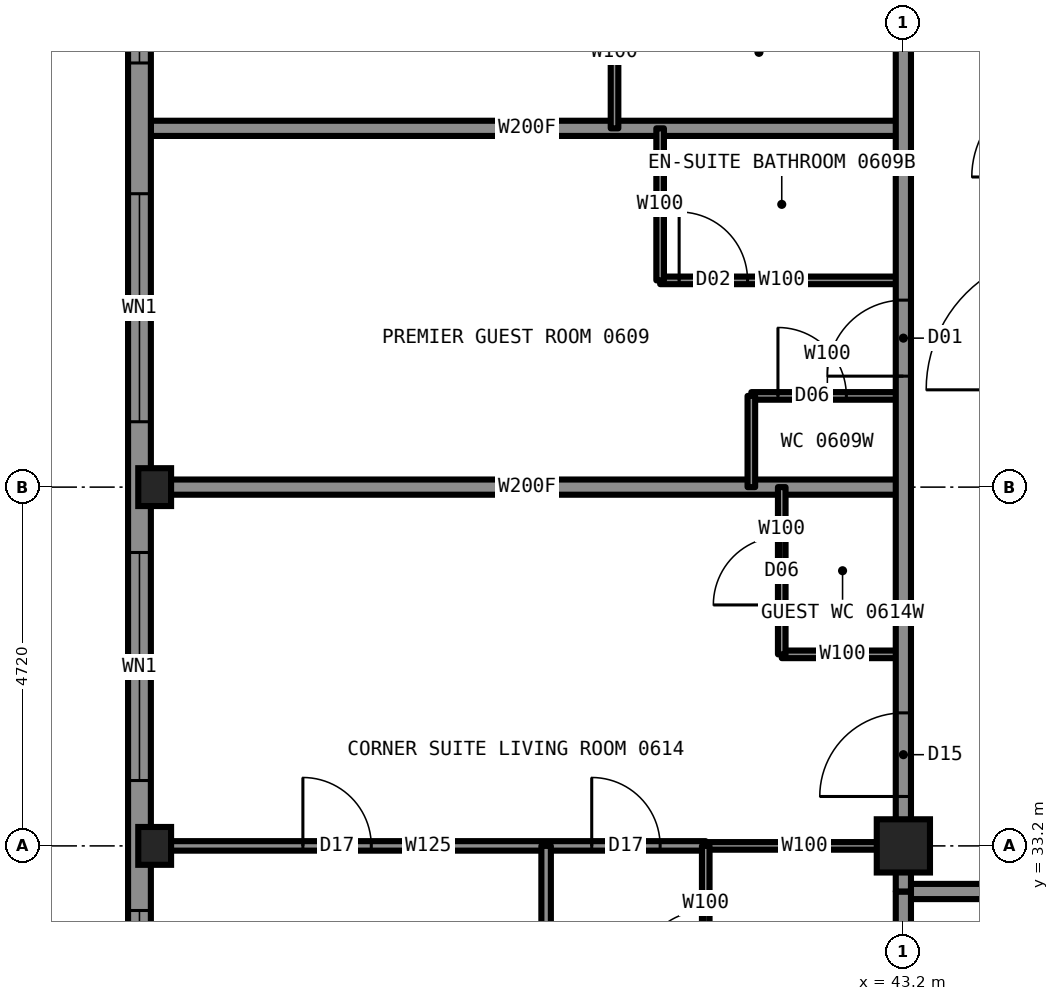
"""IFC4 building model, lengths in metres.
Left out: names, types, materials, properties, quantities, classifications, styles, units other than length and angle.
Written with IfcOpenShell. Run it as: python <this file> out.ifc"""

import sys

from ifc_helpers import new_model, si_unit, direction, frame, frame_2d, origin, origin_2d, place, context, subcontext, project, spatial, rectangle, hollow_rectangle, i_section, extrude, element, fill, save


model = new_model("IFC4")
c1 = context("Model", 3, precision=1e-05, world=origin(), true_north=direction((0.0, 1.0)))
c2 = subcontext(c1, "Body", "Model", "MODEL_VIEW")
j1 = project(units=[si_unit("LENGTHUNIT", "METRE"), si_unit("PLANEANGLEUNIT", "RADIAN")], contexts=[c1])
p1 = place(None, origin())
s1 = spatial("IfcSite", under=j1, at=p1, CompositionType="ELEMENT")
p2 = place(p1, origin())
s2 = spatial("IfcBuilding", under=s1, at=p2, CompositionType="ELEMENT")
p3 = place(p2, frame((0.0, 0.0, 28.5)))
s3 = spatial("IfcBuildingStorey", under=s2, at=p3, CompositionType="ELEMENT", Elevation=28.5)
for number, where, z_axis, x_axis in (
    (1, (33.35, 33.2, 0.0), (0.0, 0.0, 1.0), (1.0, 0.0, 0.0)),
    (2, (33.35, 37.92, 0.0), (0.0, 0.0, 1.0), (1.0, 0.0, 0.0)),
):
    element("IfcColumn", number, at=place(p3, frame(where, z_axis=z_axis, x_axis=x_axis)), inside=s3, PredefinedType="COLUMN", context=c2, shape_type="SweptSolid", body=[
        extrude(i_section(OverallWidth=0.432, OverallDepth=0.498, WebThickness=0.056, FlangeThickness=0.089, at=origin_2d()), origin(), (0.0, 0.0, 1.0), 3.5),
    ])
p4 = place(p3, frame((43.2, 33.2, 0.0), z_axis=(0.0, 0.0, 1.0), x_axis=(1.0, 0.0, 0.0)))
e3 = element("IfcColumn", 3, at=p4, inside=s3, PredefinedType="COLUMN", context=c2, shape_type="SweptSolid", body=[
    extrude(hollow_rectangle(XDim=0.7, YDim=0.7, WallThickness=0.06, at=origin_2d()), origin(), (0.0, 0.0, 1.0), 3.5),
])
p5 = place(p3, frame((40.6, 33.2, 0.0), z_axis=(0.0, 0.0, 1.0), x_axis=(1.0, 0.0, 0.0)))
e4 = element("IfcWall", 4, at=p5, inside=s3, PredefinedType="PARTITIONING", context=c2, shape_type="SweptSolid", body=[
    extrude(rectangle(XDim=2.6, YDim=0.1, at=frame_2d((1.3, 0.0))), origin(), (0.0, 0.0, 1.0), 2.573),
])
p6 = place(p3, frame((33.3, 33.2, 0.0), z_axis=(0.0, 0.0, 1.0), x_axis=(1.0, 0.0, 0.0)))
e5 = element("IfcWall", 5, at=p6, inside=s3, PredefinedType="PARTITIONING", context=c2, shape_type="SweptSolid", body=[
    extrude(rectangle(XDim=7.3, YDim=0.125, at=frame_2d((3.65, 0.0))), origin(), (0.0, 0.0, 1.0), 2.573),
])
p7 = place(p6, frame((5.8, 0.0, 0.0)))
e6 = element("IfcOpeningElement", 6, at=p7, cuts=e5, PredefinedType="OPENING", context=c2, shape_type="SweptSolid", body=[
    extrude(rectangle(XDim=0.9, YDim=2.2, at=frame_2d((0.45, 1.1))), frame((0.0, 0.073, 0.0), z_axis=(0.0, -1.0, 0.0), x_axis=(1.0, 0.0, 0.0)), (0.0, 0.0, 1.0), 0.145),
])
p8 = place(p6, frame((2.0, 0.0, 0.0)))
e7 = element("IfcOpeningElement", 7, at=p8, cuts=e5, PredefinedType="OPENING", context=c2, shape_type="SweptSolid", body=[
    extrude(rectangle(XDim=0.9, YDim=2.2, at=frame_2d((0.45, 1.1))), frame((0.0, 0.073, 0.0), z_axis=(0.0, -1.0, 0.0), x_axis=(1.0, 0.0, 0.0)), (0.0, 0.0, 1.0), 0.145),
])
p9 = place(p3, frame((43.2, 32.6, 0.0), z_axis=(0.0, 0.0, 1.0), x_axis=(1.0, 0.0, 0.0)))
e8 = element("IfcWall", 8, at=p9, inside=s3, PredefinedType="PARTITIONING", context=c2, shape_type="SweptSolid", body=[
    extrude(rectangle(XDim=23.6, YDim=0.2, at=frame_2d((11.8, 0.0))), origin(), (0.0, 0.0, 1.0), 3.33),
])
p10 = place(p9, frame((1.85, 0.0, 0.0)))
e9 = element("IfcOpeningElement", 9, at=p10, cuts=e8, PredefinedType="OPENING", context=c2, shape_type="SweptSolid", body=[
    extrude(rectangle(XDim=1.1, YDim=2.2, at=frame_2d((0.55, 1.1))), frame((0.0, 0.11, 0.0), z_axis=(0.0, -1.0, 0.0), x_axis=(1.0, 0.0, 0.0)), (0.0, 0.0, 1.0), 0.22),
])
p11 = place(p9, frame((14.56, 0.0, 0.0)))
e10 = element("IfcOpeningElement", 10, at=p11, cuts=e8, PredefinedType="OPENING", context=c2, shape_type="SweptSolid", body=[
    extrude(rectangle(XDim=1.0, YDim=2.2, at=frame_2d((0.5, 1.1))), frame((0.0, 0.11, 0.0), z_axis=(0.0, -1.0, 0.0), x_axis=(1.0, 0.0, 0.0)), (0.0, 0.0, 1.0), 0.22),
])
p12 = place(p9, frame((19.28, 0.0, 0.0)))
e11 = element("IfcOpeningElement", 11, at=p12, cuts=e8, PredefinedType="OPENING", context=c2, shape_type="SweptSolid", body=[
    extrude(rectangle(XDim=1.0, YDim=2.2, at=frame_2d((0.5, 1.1))), frame((0.0, 0.11, 0.0), z_axis=(0.0, -1.0, 0.0), x_axis=(1.0, 0.0, 0.0)), (0.0, 0.0, 1.0), 0.22),
])
p13 = place(p3, frame((33.3, 42.64, 0.0), z_axis=(0.0, 0.0, 1.0), x_axis=(1.0, 0.0, 0.0)))
e12 = element("IfcWall", 12, at=p13, inside=s3, PredefinedType="PARTITIONING", context=c2, shape_type="SweptSolid", body=[
    extrude(rectangle(XDim=9.9, YDim=0.2, at=frame_2d((4.95, 0.0))), origin(), (0.0, 0.0, 1.0), 2.723),
])
p14 = place(p3, frame((40.0, 40.64, 0.0), z_axis=(0.0, 0.0, 1.0), x_axis=(1.0, 0.0, 0.0)))
e13 = element("IfcWall", 13, at=p14, inside=s3, PredefinedType="PARTITIONING", context=c2, shape_type="SweptSolid", body=[
    extrude(rectangle(XDim=3.2, YDim=0.1, at=frame_2d((1.6, 0.0))), origin(), (0.0, 0.0, 1.0), 3.33),
])
p15 = place(p14, frame((0.25, 0.0, 0.0)))
e14 = element("IfcOpeningElement", 14, at=p15, cuts=e13, PredefinedType="OPENING", context=c2, shape_type="SweptSolid", body=[
    extrude(rectangle(XDim=0.9, YDim=2.1, at=frame_2d((0.45, 1.05))), frame((0.0, 0.06, 0.0), z_axis=(0.0, -1.0, 0.0), x_axis=(1.0, 0.0, 0.0)), (0.0, 0.0, 1.0), 0.12),
])
p16 = place(p3, frame((41.2, 39.12, 0.0), z_axis=(0.0, 0.0, 1.0), x_axis=(1.0, 0.0, 0.0)))
e15 = element("IfcWall", 15, at=p16, inside=s3, PredefinedType="PARTITIONING", context=c2, shape_type="SweptSolid", body=[
    extrude(rectangle(XDim=2.0, YDim=0.1, at=frame_2d((1.0, 0.0))), origin(), (0.0, 0.0, 1.0), 3.33),
])
p17 = place(p16, frame((0.35, 0.0, 0.0)))
e16 = element("IfcOpeningElement", 16, at=p17, cuts=e15, PredefinedType="OPENING", context=c2, shape_type="SweptSolid", body=[
    extrude(rectangle(XDim=0.9, YDim=2.1, at=frame_2d((0.45, 1.05))), frame((0.0, 0.06, 0.0), z_axis=(0.0, -1.0, 0.0), x_axis=(1.0, 0.0, 0.0)), (0.0, 0.0, 1.0), 0.12),
])
p18 = place(p3, frame((33.3, 37.92, 0.0), z_axis=(0.0, 0.0, 1.0), x_axis=(1.0, 0.0, 0.0)))
e17 = element("IfcWall", 17, at=p18, inside=s3, PredefinedType="PARTITIONING", context=c2, shape_type="SweptSolid", body=[
    extrude(rectangle(XDim=9.9, YDim=0.2, at=frame_2d((4.95, 0.0))), origin(), (0.0, 0.0, 1.0), 2.573),
])
p19 = place(p3, frame((41.6, 35.72, 0.0), z_axis=(0.0, 0.0, 1.0), x_axis=(1.0, 0.0, 0.0)))
e18 = element("IfcWall", 18, at=p19, inside=s3, PredefinedType="PARTITIONING", context=c2, shape_type="SweptSolid", body=[
    extrude(rectangle(XDim=1.6, YDim=0.1, at=frame_2d((0.8, 0.0))), origin(), (0.0, 0.0, 1.0), 2.723),
])
p20 = place(p3, frame((43.2, 33.22, 0.0), z_axis=(0.0, 0.0, 1.0), x_axis=(0.0, 1.0, 0.0)))
e19 = element("IfcWall", 19, at=p20, inside=s3, PredefinedType="PARTITIONING", context=c2, shape_type="SweptSolid", body=[
    extrude(rectangle(XDim=23.56, YDim=0.2, at=frame_2d((11.78, 0.0))), origin(), (0.0, 0.0, 1.0), 3.33),
])
p21 = place(p20, frame((6.16, 0.0, 0.0)))
e20 = element("IfcOpeningElement", 20, at=p21, cuts=e19, PredefinedType="OPENING", context=c2, shape_type="SweptSolid", body=[
    extrude(rectangle(XDim=1.0, YDim=2.2, at=frame_2d((0.5, 1.1))), frame((0.0, 0.11, 0.0), z_axis=(0.0, -1.0, 0.0), x_axis=(1.0, 0.0, 0.0)), (0.0, 0.0, 1.0), 0.22),
])
p22 = place(p20, frame((11.68, 0.0, 0.0)))
e21 = element("IfcOpeningElement", 21, at=p22, cuts=e19, PredefinedType="OPENING", context=c2, shape_type="SweptSolid", body=[
    extrude(rectangle(XDim=1.0, YDim=2.2, at=frame_2d((0.5, 1.1))), frame((0.0, 0.11, 0.0), z_axis=(0.0, -1.0, 0.0), x_axis=(1.0, 0.0, 0.0)), (0.0, 0.0, 1.0), 0.22),
])
p23 = place(p20, frame((14.54, 0.0, 0.0)))
e22 = element("IfcOpeningElement", 22, at=p23, cuts=e19, PredefinedType="OPENING", context=c2, shape_type="SweptSolid", body=[
    extrude(rectangle(XDim=1.0, YDim=2.2, at=frame_2d((0.5, 1.1))), frame((0.0, 0.11, 0.0), z_axis=(0.0, -1.0, 0.0), x_axis=(1.0, 0.0, 0.0)), (0.0, 0.0, 1.0), 0.22),
])
p24 = place(p20, frame((21.83, 0.0, 0.0)))
e23 = element("IfcOpeningElement", 23, at=p24, cuts=e19, PredefinedType="OPENING", context=c2, shape_type="SweptSolid", body=[
    extrude(rectangle(XDim=1.1, YDim=2.2, at=frame_2d((0.55, 1.1))), frame((0.0, 0.11, 0.0), z_axis=(0.0, -1.0, 0.0), x_axis=(1.0, 0.0, 0.0)), (0.0, 0.0, 1.0), 0.22),
])
p25 = place(p20, frame((0.63, 0.0, 0.0)))
e24 = element("IfcOpeningElement", 24, at=p25, cuts=e19, PredefinedType="OPENING", context=c2, shape_type="SweptSolid", body=[
    extrude(rectangle(XDim=1.1, YDim=2.2, at=frame_2d((0.55, 1.1))), frame((0.0, 0.11, 0.0), z_axis=(0.0, -1.0, 0.0), x_axis=(1.0, 0.0, 0.0)), (0.0, 0.0, 1.0), 0.22),
])
p26 = place(p3, frame((43.2, 30.6, 0.0), z_axis=(0.0, 0.0, 1.0), x_axis=(0.0, 1.0, 0.0)))
e25 = element("IfcWall", 25, at=p26, inside=s3, PredefinedType="PARTITIONING", context=c2, shape_type="SweptSolid", body=[
    extrude(rectangle(XDim=2.0, YDim=0.2, at=frame_2d((1.0, 0.0))), origin(), (0.0, 0.0, 1.0), 2.573),
])
p27 = place(p3, frame((41.6, 35.72, 0.0), z_axis=(0.0, 0.0, 1.0), x_axis=(0.0, 1.0, 0.0)))
e26 = element("IfcWall", 26, at=p27, inside=s3, PredefinedType="PARTITIONING", context=c2, shape_type="SweptSolid", body=[
    extrude(rectangle(XDim=2.2, YDim=0.1, at=frame_2d((1.1, 0.0))), origin(), (0.0, 0.0, 1.0), 3.33),
])
p28 = place(p27, frame((0.65, 0.0, 0.0)))
e27 = element("IfcOpeningElement", 27, at=p28, cuts=e26, PredefinedType="OPENING", context=c2, shape_type="SweptSolid", body=[
    extrude(rectangle(XDim=0.9, YDim=2.1, at=frame_2d((0.45, 1.05))), frame((0.0, 0.06, 0.0), z_axis=(0.0, -1.0, 0.0), x_axis=(1.0, 0.0, 0.0)), (0.0, 0.0, 1.0), 0.12),
])
p29 = place(p3, frame((41.2, 37.92, 0.0), z_axis=(0.0, 0.0, 1.0), x_axis=(0.0, 1.0, 0.0)))
e28 = element("IfcWall", 28, at=p29, inside=s3, PredefinedType="PARTITIONING", context=c2, shape_type="SweptSolid", body=[
    extrude(rectangle(XDim=1.2, YDim=0.1, at=frame_2d((0.6, 0.0))), origin(), (0.0, 0.0, 1.0), 3.33),
])
p30 = place(p3, frame((40.6, 30.6, 0.0), z_axis=(0.0, 0.0, 1.0), x_axis=(0.0, 1.0, 0.0)))
e29 = element("IfcWall", 29, at=p30, inside=s3, PredefinedType="PARTITIONING", context=c2, shape_type="SweptSolid", body=[
    extrude(rectangle(XDim=2.6, YDim=0.1, at=frame_2d((1.3, 0.0))), origin(), (0.0, 0.0, 1.0), 3.33),
])
p31 = place(p30, frame((0.85, 0.0, 0.0)))
e30 = element("IfcOpeningElement", 30, at=p31, cuts=e29, PredefinedType="OPENING", context=c2, shape_type="SweptSolid", body=[
    extrude(rectangle(XDim=0.9, YDim=2.1, at=frame_2d((0.45, 1.05))), frame((0.0, 0.06, 0.0), z_axis=(0.0, -1.0, 0.0), x_axis=(1.0, 0.0, 0.0)), (0.0, 0.0, 1.0), 0.12),
])
for number, where, z_axis, x_axis in (
    (31, (40.0, 40.64, 0.0), (0.0, 0.0, 1.0), (0.0, 1.0, 0.0)),
    (32, (39.4, 42.64, 0.0), (0.0, 0.0, 1.0), (0.0, 1.0, 0.0)),
):
    element("IfcWall", number, at=place(p3, frame(where, z_axis=z_axis, x_axis=x_axis)), inside=s3, PredefinedType="PARTITIONING", context=c2, shape_type="SweptSolid", body=[
        extrude(rectangle(XDim=2.0, YDim=0.1, at=frame_2d((1.0, 0.0))), origin(), (0.0, 0.0, 1.0), 3.33),
    ])
p32 = place(p3, frame((38.5, 23.306, 0.0), z_axis=(0.0, 0.0, 1.0), x_axis=(0.0, 1.0, 0.0)))
e33 = element("IfcWall", 33, at=p32, inside=s3, PredefinedType="PARTITIONING", context=c2, shape_type="SweptSolid", body=[
    extrude(rectangle(XDim=9.894, YDim=0.125, at=frame_2d((4.947, 0.0))), origin(), (0.0, 0.0, 1.0), 3.33),
])
p33 = place(p3, frame((33.15, 61.5, 0.0), z_axis=(0.0, 0.0, 1.0), x_axis=(0.0, -1.0, 0.0)))
e34 = element("IfcWall", 34, at=p33, inside=s3, PredefinedType="SOLIDWALL", context=c2, shape_type="SweptSolid", body=[
    extrude(rectangle(XDim=33.0, YDim=0.3, at=frame_2d((16.5, 0.0))), origin(), (0.0, 0.0, 1.0), 2.83),
])
p34 = place(p33, frame((0.85, 0.0, 0.5)))
e35 = element("IfcOpeningElement", 35, at=p34, cuts=e34, PredefinedType="OPENING", context=c2, shape_type="SweptSolid", body=[
    extrude(rectangle(XDim=3.0, YDim=2.0, at=frame_2d((1.5, 1.0))), frame((0.0, 0.16, 0.0), z_axis=(0.0, -1.0, 0.0), x_axis=(1.0, 0.0, 0.0)), (0.0, 0.0, 1.0), 0.32),
])
p35 = place(p33, frame((5.56, 0.0, 0.5)))
e36 = element("IfcOpeningElement", 36, at=p35, cuts=e34, PredefinedType="OPENING", context=c2, shape_type="SweptSolid", body=[
    extrude(rectangle(XDim=3.0, YDim=2.0, at=frame_2d((1.5, 1.0))), frame((0.0, 0.16, 0.0), z_axis=(0.0, -1.0, 0.0), x_axis=(1.0, 0.0, 0.0)), (0.0, 0.0, 1.0), 0.32),
])
p36 = place(p33, frame((10.28, 0.0, 0.5)))
e37 = element("IfcOpeningElement", 37, at=p36, cuts=e34, PredefinedType="OPENING", context=c2, shape_type="SweptSolid", body=[
    extrude(rectangle(XDim=3.0, YDim=2.0, at=frame_2d((1.5, 1.0))), frame((0.0, 0.16, 0.0), z_axis=(0.0, -1.0, 0.0), x_axis=(1.0, 0.0, 0.0)), (0.0, 0.0, 1.0), 0.32),
])
p37 = place(p33, frame((15.0, 0.0, 0.5)))
e38 = element("IfcOpeningElement", 38, at=p37, cuts=e34, PredefinedType="OPENING", context=c2, shape_type="SweptSolid", body=[
    extrude(rectangle(XDim=3.0, YDim=2.0, at=frame_2d((1.5, 1.0))), frame((0.0, 0.16, 0.0), z_axis=(0.0, -1.0, 0.0), x_axis=(1.0, 0.0, 0.0)), (0.0, 0.0, 1.0), 0.32),
])
p38 = place(p33, frame((19.72, 0.0, 0.5)))
e39 = element("IfcOpeningElement", 39, at=p38, cuts=e34, PredefinedType="OPENING", context=c2, shape_type="SweptSolid", body=[
    extrude(rectangle(XDim=3.0, YDim=2.0, at=frame_2d((1.5, 1.0))), frame((0.0, 0.16, 0.0), z_axis=(0.0, -1.0, 0.0), x_axis=(1.0, 0.0, 0.0)), (0.0, 0.0, 1.0), 0.32),
])
p39 = place(p33, frame((24.44, 0.0, 0.5)))
e40 = element("IfcOpeningElement", 40, at=p39, cuts=e34, PredefinedType="OPENING", context=c2, shape_type="SweptSolid", body=[
    extrude(rectangle(XDim=3.0, YDim=2.0, at=frame_2d((1.5, 1.0))), frame((0.0, 0.16, 0.0), z_axis=(0.0, -1.0, 0.0), x_axis=(1.0, 0.0, 0.0)), (0.0, 0.0, 1.0), 0.32),
])
p40 = place(p33, frame((29.15, 0.0, 0.5)))
e41 = element("IfcOpeningElement", 41, at=p40, cuts=e34, PredefinedType="OPENING", context=c2, shape_type="SweptSolid", body=[
    extrude(rectangle(XDim=3.0, YDim=2.0, at=frame_2d((1.5, 1.0))), frame((0.0, 0.16, 0.0), z_axis=(0.0, -1.0, 0.0), x_axis=(1.0, 0.0, 0.0)), (0.0, 0.0, 1.0), 0.32),
])
p41 = place(p3, frame((43.2, 32.6, 0.0), z_axis=(0.0, 0.0, 1.0), x_axis=(0.0, 1.0, 0.0)))
e42 = element("IfcWall", 42, at=p41, inside=s3, PredefinedType="PARTITIONING", context=c2, shape_type="SweptSolid", body=[
    extrude(rectangle(XDim=0.62, YDim=0.2, at=frame_2d((0.31, 0.0))), origin(), (0.0, 0.0, 1.0), 2.573),
])
p42 = place(p21, origin())
e43 = element("IfcDoor", 43, at=p42, inside=s3, OperationType="SINGLE_SWING_LEFT", PredefinedType="DOOR", context=c2, shape_type="SweptSolid", body=[
    extrude(rectangle(XDim=1.0, YDim=2.2, at=frame_2d((0.5, 1.1))), frame((0.0, 0.025, 0.0), z_axis=(0.0, -1.0, 0.0), x_axis=(1.0, 0.0, 0.0)), (0.0, 0.0, 1.0), 0.05),
])
fill(e20, e43)
p43 = place(p15, origin())
e44 = element("IfcDoor", 44, at=p43, inside=s3, OperationType="SINGLE_SWING_RIGHT", PredefinedType="DOOR", context=c2, shape_type="SweptSolid", body=[
    extrude(rectangle(XDim=0.9, YDim=2.1, at=frame_2d((0.45, 1.05))), frame((0.0, 0.025, 0.0), z_axis=(0.0, -1.0, 0.0), x_axis=(1.0, 0.0, 0.0)), (0.0, 0.0, 1.0), 0.05),
])
fill(e14, e44)
p44 = place(p17, origin())
e45 = element("IfcDoor", 45, at=p44, inside=s3, OperationType="SINGLE_SWING_LEFT", PredefinedType="DOOR", context=c2, shape_type="SweptSolid", body=[
    extrude(rectangle(XDim=0.9, YDim=2.1, at=frame_2d((0.45, 1.05))), frame((0.0, 0.025, 0.0), z_axis=(0.0, -1.0, 0.0), x_axis=(1.0, 0.0, 0.0)), (0.0, 0.0, 1.0), 0.05),
])
fill(e16, e45)
p45 = place(p25, origin())
e46 = element("IfcDoor", 46, at=p45, inside=s3, OperationType="SINGLE_SWING_LEFT", PredefinedType="DOOR", context=c2, shape_type="SweptSolid", body=[
    extrude(rectangle(XDim=1.1, YDim=2.2, at=frame_2d((0.55, 1.1))), frame((0.0, 0.025, 0.0), z_axis=(0.0, -1.0, 0.0), x_axis=(1.0, 0.0, 0.0)), (0.0, 0.0, 1.0), 0.05),
])
fill(e24, e46)
p46 = place(p31, origin())
e47 = element("IfcDoor", 47, at=p46, inside=s3, OperationType="SINGLE_SWING_RIGHT", PredefinedType="DOOR", context=c2, shape_type="SweptSolid", body=[
    extrude(rectangle(XDim=0.9, YDim=2.1, at=frame_2d((0.45, 1.05))), frame((0.0, 0.025, 0.0), z_axis=(0.0, -1.0, 0.0), x_axis=(1.0, 0.0, 0.0)), (0.0, 0.0, 1.0), 0.05),
])
fill(e30, e47)
p47 = place(p7, origin())
e48 = element("IfcDoor", 48, at=p47, inside=s3, OperationType="SINGLE_SWING_LEFT", PredefinedType="DOOR", context=c2, shape_type="SweptSolid", body=[
    extrude(rectangle(XDim=0.9, YDim=2.2, at=frame_2d((0.45, 1.1))), frame((0.0, 0.025, 0.0), z_axis=(0.0, -1.0, 0.0), x_axis=(1.0, 0.0, 0.0)), (0.0, 0.0, 1.0), 0.05),
])
fill(e6, e48)
p48 = place(p8, origin())
e49 = element("IfcDoor", 49, at=p48, inside=s3, OperationType="SINGLE_SWING_LEFT", PredefinedType="DOOR", context=c2, shape_type="SweptSolid", body=[
    extrude(rectangle(XDim=0.9, YDim=2.2, at=frame_2d((0.45, 1.1))), frame((0.0, 0.025, 0.0), z_axis=(0.0, -1.0, 0.0), x_axis=(1.0, 0.0, 0.0)), (0.0, 0.0, 1.0), 0.05),
])
fill(e7, e49)
p49 = place(p28, origin())
e50 = element("IfcDoor", 50, at=p49, inside=s3, OperationType="SINGLE_SWING_LEFT", PredefinedType="DOOR", context=c2, shape_type="SweptSolid", body=[
    extrude(rectangle(XDim=0.9, YDim=2.1, at=frame_2d((0.45, 1.05))), frame((0.0, 0.025, 0.0), z_axis=(0.0, -1.0, 0.0), x_axis=(1.0, 0.0, 0.0)), (0.0, 0.0, 1.0), 0.05),
])
fill(e27, e50)
p50 = place(p37, origin())
e51 = element("IfcWindow", 51, at=p50, inside=s3, PartitioningType="SINGLE_PANEL", PredefinedType="WINDOW", context=c2, shape_type="SweptSolid", body=[
    extrude(rectangle(XDim=3.0, YDim=2.0, at=frame_2d((1.5, 1.0))), frame((0.0, 0.03, 0.0), z_axis=(0.0, -1.0, 0.0), x_axis=(1.0, 0.0, 0.0)), (0.0, 0.0, 1.0), 0.06),
])
fill(e38, e51)
p51 = place(p38, origin())
e52 = element("IfcWindow", 52, at=p51, inside=s3, PartitioningType="SINGLE_PANEL", PredefinedType="WINDOW", context=c2, shape_type="SweptSolid", body=[
    extrude(rectangle(XDim=3.0, YDim=2.0, at=frame_2d((1.5, 1.0))), frame((0.0, 0.03, 0.0), z_axis=(0.0, -1.0, 0.0), x_axis=(1.0, 0.0, 0.0)), (0.0, 0.0, 1.0), 0.06),
])
fill(e39, e52)
p52 = place(p39, origin())
e53 = element("IfcWindow", 53, at=p52, inside=s3, PartitioningType="SINGLE_PANEL", PredefinedType="WINDOW", context=c2, shape_type="SweptSolid", body=[
    extrude(rectangle(XDim=3.0, YDim=2.0, at=frame_2d((1.5, 1.0))), frame((0.0, 0.03, 0.0), z_axis=(0.0, -1.0, 0.0), x_axis=(1.0, 0.0, 0.0)), (0.0, 0.0, 1.0), 0.06),
])
fill(e40, e53)
p53 = place(p40, origin())
e54 = element("IfcWindow", 54, at=p53, inside=s3, PartitioningType="SINGLE_PANEL", PredefinedType="WINDOW", context=c2, shape_type="SweptSolid", body=[
    extrude(rectangle(XDim=3.0, YDim=2.0, at=frame_2d((1.5, 1.0))), frame((0.0, 0.03, 0.0), z_axis=(0.0, -1.0, 0.0), x_axis=(1.0, 0.0, 0.0)), (0.0, 0.0, 1.0), 0.06),
])
fill(e41, e54)
save(model, sys.argv[1])
